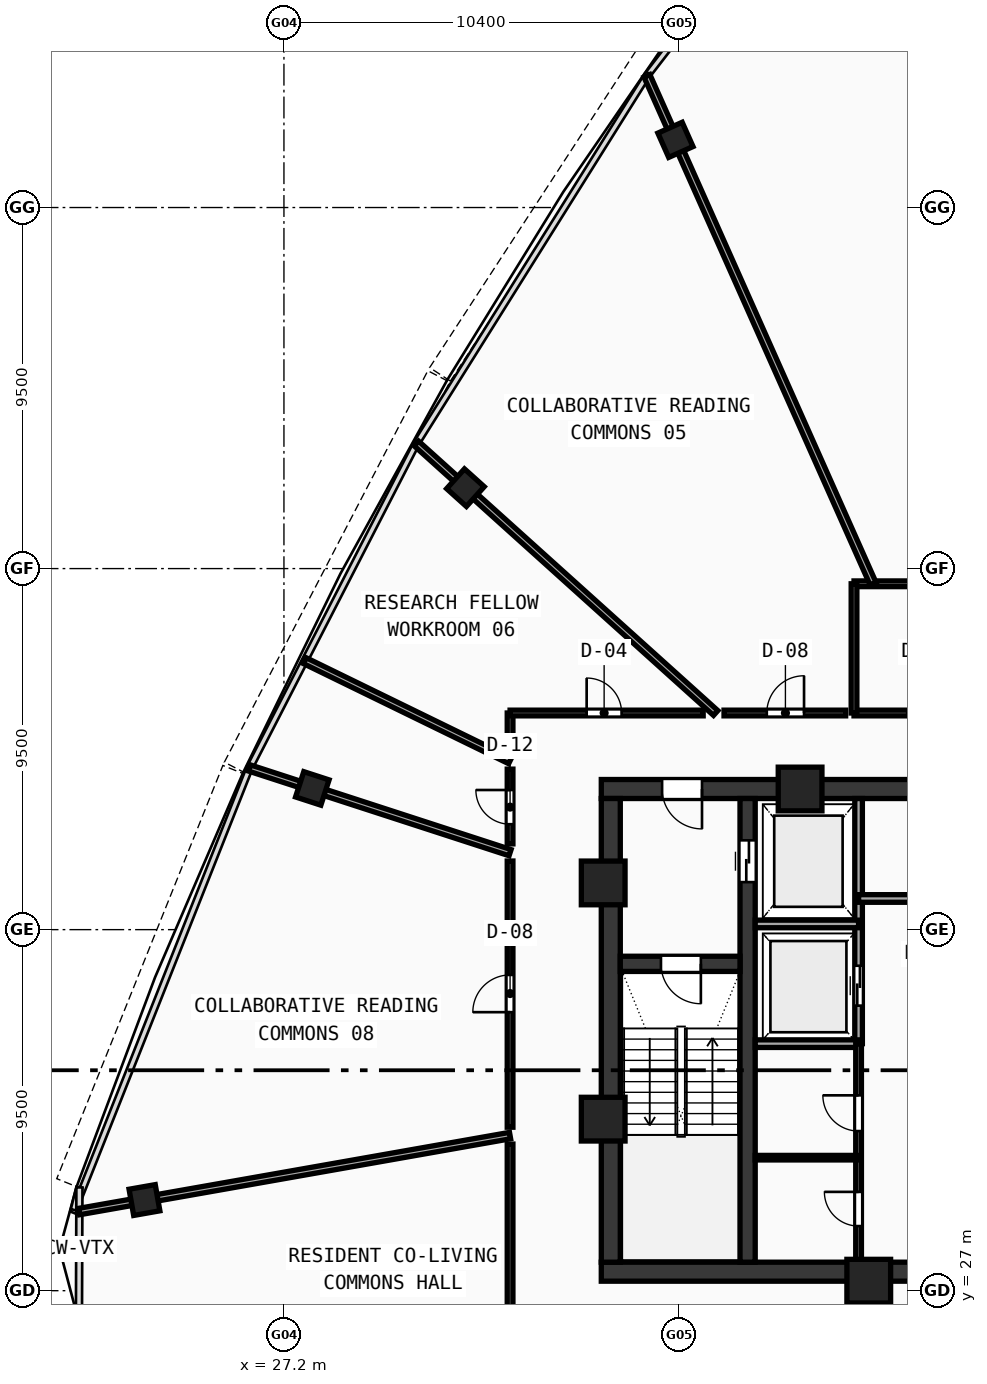
"""IFC4 building model, lengths in metres.
Left out: names, types, materials, properties, quantities, classifications, styles, units other than length and angle.
Written with IfcOpenShell. Run it as: python <this file> out.ifc"""

import sys

from ifc_helpers import new_model, si_unit, direction, frame, frame_2d, origin, origin_with_axes, origin_2d, place, context, subcontext, project, spatial, rectangle, hollow_rectangle, extrude, source, transform, mapped, element, fill, save


model = new_model("IFC4")
c1 = context("Model", 3, precision=1e-05, world=origin(), true_north=direction((0.0, 1.0)))
c2 = subcontext(c1, "Body", "Model", "MODEL_VIEW")
j1 = project(units=[si_unit("LENGTHUNIT", "METRE"), si_unit("PLANEANGLEUNIT", "RADIAN")], contexts=[c1])
p1 = place(None, origin())
s1 = spatial("IfcSite", under=j1, at=p1, CompositionType="ELEMENT")
p2 = place(p1, origin())
s2 = spatial("IfcBuilding", under=s1, at=p2, CompositionType="ELEMENT")
p3 = place(p2, frame((0.0, 0.0, 359.26)))
s3 = spatial("IfcBuildingStorey", under=s2, at=p3, CompositionType="ELEMENT", Elevation=359.26)
p4 = place(p3, frame((35.55, 27.5, 0.0), z_axis=(0.0, 0.0, 1.0), x_axis=(1.0, 0.0, 0.0)))
e1 = element("IfcWall", 1, at=p4, inside=s3, PredefinedType="SHEAR", context=c2, shape_type="SweptSolid", body=[
    extrude(rectangle(XDim=24.9, YDim=0.5, at=frame_2d((12.45, 0.0))), origin(), (0.0, 0.0, 1.0), 3.49),
])
p5 = place(p3, frame((35.55, 40.2, 0.0), z_axis=(0.0, 0.0, 1.0), x_axis=(1.0, 0.0, 0.0)))
e2 = element("IfcWall", 2, at=p5, inside=s3, PredefinedType="SHEAR", context=c2, shape_type="SweptSolid", body=[
    extrude(rectangle(XDim=11.25, YDim=0.5, at=frame_2d((5.625, 0.0))), origin(), (0.0, 0.0, 1.0), 3.49),
])
p6 = place(p5, frame((1.6, 0.0, 0.0)))
e3 = element("IfcOpeningElement", 3, at=p6, cuts=e2, PredefinedType="OPENING", context=c2, shape_type="SweptSolid", body=[
    extrude(rectangle(XDim=1.05, YDim=2.1, at=frame_2d((0.525, 1.05))), frame((0.0, 0.26, 0.0), z_axis=(0.0, -1.0, 0.0), x_axis=(1.0, 0.0, 0.0)), (0.0, 0.0, 1.0), 0.52),
])
p7 = place(p3, frame((35.8, 27.75, 0.0), z_axis=(0.0, 0.0, 1.0), x_axis=(0.0, 1.0, 0.0)))
e4 = element("IfcWall", 4, at=p7, inside=s3, PredefinedType="SHEAR", context=c2, shape_type="SweptSolid", body=[
    extrude(rectangle(XDim=12.2, YDim=0.5, at=frame_2d((6.1, 0.0))), origin(), (0.0, 0.0, 1.0), 3.49),
])
p8 = place(p3, frame((39.4, 27.75, 0.0), z_axis=(0.0, 0.0, 1.0), x_axis=(0.0, 1.0, 0.0)))
e5 = element("IfcWall", 5, at=p8, inside=s3, PredefinedType="SHEAR", context=c2, shape_type="SweptSolid", body=[
    extrude(rectangle(XDim=12.2, YDim=0.4, at=frame_2d((6.1, 0.0))), origin(), (0.0, 0.0, 1.0), 3.49),
])
p9 = place(p8, frame((10.0, 0.0, 0.0)))
e6 = element("IfcOpeningElement", 6, at=p9, cuts=e5, PredefinedType="OPENING", context=c2, shape_type="SweptSolid", body=[
    extrude(rectangle(XDim=1.1, YDim=2.1, at=frame_2d((0.55, 1.05))), frame((0.0, 0.21, 0.0), z_axis=(0.0, -1.0, 0.0), x_axis=(1.0, 0.0, 0.0)), (0.0, 0.0, 1.0), 0.42),
])
p10 = place(p3, frame((36.05, 35.6, 0.0), z_axis=(0.0, 0.0, 1.0), x_axis=(1.0, 0.0, 0.0)))
e7 = element("IfcWall", 7, at=p10, inside=s3, PredefinedType="SHEAR", context=c2, shape_type="SweptSolid", body=[
    extrude(rectangle(XDim=3.15, YDim=0.4, at=frame_2d((1.575, 0.0))), origin(), (0.0, 0.0, 1.0), 3.49),
])
p11 = place(p10, frame((1.07, 0.0, 0.0)))
e8 = element("IfcOpeningElement", 8, at=p11, cuts=e7, PredefinedType="OPENING", context=c2, shape_type="SweptSolid", body=[
    extrude(rectangle(XDim=1.05, YDim=2.1, at=frame_2d((0.525, 1.05))), frame((0.0, 0.21, 0.0), z_axis=(0.0, -1.0, 0.0), x_axis=(1.0, 0.0, 0.0)), (0.0, 0.0, 1.0), 0.42),
])
m1 = source(origin(), c2, "Body", "SweptSolid", [
    extrude(hollow_rectangle(XDim=1.15, YDim=1.15, WallThickness=0.048, at=origin_2d()), origin(), (0.0, 0.0, 1.0), 3.75),
])
for number, where, z_axis, x_axis in (
    (9, (42.588, 27.25, -0.26), (0.0, 0.0, 1.0), (1.0, 0.0, 0.0)),
    (10, (40.781, 40.2, -0.26), (0.0, 0.0, 1.0), (1.0, 0.0, 0.0)),
    (11, (35.6, 37.729, -0.26), (0.0, 0.0, 1.0), (1.0, 0.0, 0.0)),
    (12, (35.6, 31.513, -0.26), (0.0, 0.0, 1.0), (1.0, 0.0, 0.0)),
):
    element("IfcColumn", number, at=place(p3, frame(where, z_axis=z_axis, x_axis=x_axis)), inside=s3, PredefinedType="COLUMN", context=c2, shape_type="MappedRepresentation", body=[
        mapped(m1, transform((0.0, 0.0, 0.0), scale=1.0)),
    ])
m2 = source(origin(), c2, "Body", "SweptSolid", [
    extrude(hollow_rectangle(XDim=0.7, YDim=0.7, WallThickness=0.026, at=origin_2d()), origin(), (0.0, 0.0, 1.0), 3.75),
])
for number, where, z_axis, x_axis in (
    (13, (37.501, 57.281, -0.26), (0.0, 0.0, 1.0), (-0.914, -0.407, 0.0)),
    (14, (31.975, 48.129, -0.26), (0.0, 0.0, 1.0), (-0.669, -0.743, 0.0)),
    (15, (27.947, 40.216, -0.26), (0.0, 0.0, 1.0), (-0.309, -0.951, 0.0)),
    (16, (23.53, 29.385, -0.26), (0.0, 0.0, 1.0), (0.174, -0.985, 0.0)),
):
    element("IfcColumn", number, at=place(p3, frame(where, z_axis=z_axis, x_axis=x_axis)), inside=s3, PredefinedType="COLUMN", context=c2, shape_type="MappedRepresentation", body=[
        mapped(m2, transform((0.0, 0.0, 0.0), scale=1.0)),
    ])
p12 = place(p3, frame((42.32, 33.5, 0.0), z_axis=(0.0, 0.0, 1.0), x_axis=(0.0, 1.0, 0.0)))
e17 = element("IfcWall", 17, at=p12, inside=s3, PredefinedType="SOLIDWALL", context=c2, shape_type="SweptSolid", body=[
    extrude(rectangle(XDim=6.45, YDim=0.2, at=frame_2d((3.225, 0.0))), origin(), (0.0, 0.0, 1.0), 3.49),
])
p13 = place(p12, frame((1.0, 0.0, 0.0)))
e18 = element("IfcOpeningElement", 18, at=p13, cuts=e17, PredefinedType="OPENING", context=c2, shape_type="SweptSolid", body=[
    extrude(rectangle(XDim=1.05, YDim=2.1, at=frame_2d((0.525, 1.05))), frame((0.0, 0.11, 0.0), z_axis=(0.0, -1.0, 0.0), x_axis=(1.0, 0.0, 0.0)), (0.0, 0.0, 1.0), 0.22),
])
for number, where, z_axis, x_axis in (
    (19, (39.6, 36.65, 0.0), (0.0, 0.0, 1.0), (1.0, 0.0, 0.0)),
    (20, (39.6, 33.5, 0.0), (0.0, 0.0, 1.0), (1.0, 0.0, 0.0)),
):
    element("IfcWall", number, at=place(p3, frame(where, z_axis=z_axis, x_axis=x_axis)), inside=s3, PredefinedType="SOLIDWALL", context=c2, shape_type="SweptSolid", body=[
        extrude(rectangle(XDim=2.72, YDim=0.2, at=frame_2d((1.36, 0.0))), origin(), (0.0, 0.0, 1.0), 3.49),
    ])
p14 = place(p3, frame((42.32, 37.32, 0.0), z_axis=(0.0, 0.0, 1.0), x_axis=(1.0, 0.0, 0.0)))
e21 = element("IfcWall", 21, at=p14, inside=s3, PredefinedType="SOLIDWALL", context=c2, shape_type="SweptSolid", body=[
    extrude(rectangle(XDim=4.73, YDim=0.2, at=frame_2d((2.365, 0.0))), origin(), (0.0, 0.0, 1.0), 3.49),
])
p15 = place(p14, frame((1.8, 0.0, 0.0)))
e22 = element("IfcOpeningElement", 22, at=p15, cuts=e21, PredefinedType="OPENING", context=c2, shape_type="SweptSolid", body=[
    extrude(rectangle(XDim=0.9, YDim=2.1, at=frame_2d((0.45, 1.05))), frame((0.0, 0.11, 0.0), z_axis=(0.0, -1.0, 0.0), x_axis=(1.0, 0.0, 0.0)), (0.0, 0.0, 1.0), 0.22),
])
p16 = place(p3, frame((42.32, 27.6, 0.0), z_axis=(0.0, 0.0, 1.0), x_axis=(0.0, 1.0, 0.0)))
e23 = element("IfcWall", 23, at=p16, inside=s3, PredefinedType="PARTITIONING", context=c2, shape_type="SweptSolid", body=[
    extrude(rectangle(XDim=5.9, YDim=0.15, at=frame_2d((2.95, 0.0))), origin(), (0.0, 0.0, 1.0), 3.49),
])
p17 = place(p16, frame((1.1, 0.0, 0.0)))
e24 = element("IfcOpeningElement", 24, at=p17, cuts=e23, PredefinedType="OPENING", context=c2, shape_type="SweptSolid", body=[
    extrude(rectangle(XDim=0.9, YDim=2.1, at=frame_2d((0.45, 1.05))), frame((0.0, 0.085, 0.0), z_axis=(0.0, -1.0, 0.0), x_axis=(1.0, 0.0, 0.0)), (0.0, 0.0, 1.0), 0.17),
])
p18 = place(p16, frame((3.6, 0.0, 0.0)))
e25 = element("IfcOpeningElement", 25, at=p18, cuts=e23, PredefinedType="OPENING", context=c2, shape_type="SweptSolid", body=[
    extrude(rectangle(XDim=0.94, YDim=2.1, at=frame_2d((0.47, 1.05))), frame((0.0, 0.085, 0.0), z_axis=(0.0, -1.0, 0.0), x_axis=(1.0, 0.0, 0.0)), (0.0, 0.0, 1.0), 0.17),
])
p19 = place(p3, frame((39.6, 30.5, 0.0), z_axis=(0.0, 0.0, 1.0), x_axis=(1.0, 0.0, 0.0)))
e26 = element("IfcWall", 26, at=p19, inside=s3, PredefinedType="PARTITIONING", context=c2, shape_type="SweptSolid", body=[
    extrude(rectangle(XDim=2.72, YDim=0.12, at=frame_2d((1.36, 0.0))), origin(), (0.0, 0.0, 1.0), 3.49),
])
p20 = place(p3, frame((42.2, 42.2, 0.0), z_axis=(0.0, 0.0, 1.0), x_axis=(1.0, 0.0, 0.0)))
e27 = element("IfcWall", 27, at=p20, inside=s3, PredefinedType="PARTITIONING", context=c2, shape_type="SweptSolid", body=[
    extrude(rectangle(XDim=4.9, YDim=0.15, at=frame_2d((2.45, 0.0))), origin(), (0.0, 0.0, 1.0), 2.89),
])
p21 = place(p20, frame((1.4, 0.0, 0.0)))
e28 = element("IfcOpeningElement", 28, at=p21, cuts=e27, PredefinedType="OPENING", context=c2, shape_type="SweptSolid", body=[
    extrude(rectangle(XDim=0.92, YDim=2.1, at=frame_2d((0.46, 1.05))), frame((0.0, 0.085, 0.0), z_axis=(0.0, -1.0, 0.0), x_axis=(1.0, 0.0, 0.0)), (0.0, 0.0, 1.0), 0.17),
])
p22 = place(p3, frame((42.2, 45.6, 0.0), z_axis=(0.0, 0.0, 1.0), x_axis=(1.0, 0.0, 0.0)))
e29 = element("IfcWall", 29, at=p22, inside=s3, PredefinedType="PARTITIONING", context=c2, shape_type="SweptSolid", body=[
    extrude(rectangle(XDim=4.9, YDim=0.15, at=frame_2d((2.45, 0.0))), origin(), (0.0, 0.0, 1.0), 2.89),
])
p23 = place(p3, frame((42.2, 42.2, 0.0), z_axis=(0.0, 0.0, 1.0), x_axis=(0.0, 1.0, 0.0)))
e30 = element("IfcWall", 30, at=p23, inside=s3, PredefinedType="PARTITIONING", context=c2, shape_type="SweptSolid", body=[
    extrude(rectangle(XDim=3.4, YDim=0.15, at=frame_2d((1.7, 0.0))), origin(), (0.0, 0.0, 1.0), 3.49),
])
p24 = place(p3, frame((42.702, 45.6, 0.0), z_axis=(0.0, 0.0, 1.0), x_axis=(-0.406749951551, 0.913539532212, 0.0)))
e31 = element("IfcWall", 31, at=p24, inside=s3, PredefinedType="PARTITIONING", context=c2, shape_type="SweptSolid", body=[
    extrude(rectangle(XDim=14.63, YDim=0.17, at=frame_2d((7.315, 0.0))), origin(), (0.0, 0.0, 1.0), 2.89),
])
p25 = place(p3, frame((38.56, 42.2, 0.0), z_axis=(0.0, 0.0, 1.0), x_axis=(-0.743152066897, 0.66912256386, 0.0)))
e32 = element("IfcWall", 32, at=p25, inside=s3, PredefinedType="PARTITIONING", context=c2, shape_type="SweptSolid", body=[
    extrude(rectangle(XDim=10.596, YDim=0.17, at=frame_2d((5.298, 0.0))), origin(), (0.0, 0.0, 1.0), 2.89),
])
p26 = place(p3, frame((33.15, 40.943, 0.0), z_axis=(0.0, 0.0, 1.0), x_axis=(-0.898803189206, 0.438352400557, 0.0)))
e33 = element("IfcWall", 33, at=p26, inside=s3, PredefinedType="PARTITIONING", context=c2, shape_type="SweptSolid", body=[
    extrude(rectangle(XDim=6.01, YDim=0.17, at=frame_2d((3.005, 0.0))), origin(), (0.0, 0.0, 1.0), 2.89),
])
p27 = place(p3, frame((33.15, 38.525, 0.0), z_axis=(0.0, 0.0, 1.0), x_axis=(-0.951060950279, 0.309003347644, 0.0)))
e34 = element("IfcWall", 34, at=p27, inside=s3, PredefinedType="PARTITIONING", context=c2, shape_type="SweptSolid", body=[
    extrude(rectangle(XDim=7.207, YDim=0.17, at=frame_2d((3.604, 0.0))), origin(), (0.0, 0.0, 1.0), 2.89),
])
p28 = place(p3, frame((33.15, 31.082, 0.0), z_axis=(0.0, 0.0, 1.0), x_axis=(-0.984809370591, -0.17363900367, 0.0)))
e35 = element("IfcWall", 35, at=p28, inside=s3, PredefinedType="PARTITIONING", context=c2, shape_type="SweptSolid", body=[
    extrude(rectangle(XDim=11.517, YDim=0.17, at=frame_2d((5.758, 0.0))), origin(), (0.0, 0.0, 1.0), 2.89),
])
p29 = place(p3, frame((33.15, 24.9, 0.0), z_axis=(0.0, 0.0, 1.0), x_axis=(0.0, 1.0, 0.0)))
e36 = element("IfcWall", 36, at=p29, inside=s3, PredefinedType="PARTITIONING", context=c2, shape_type="SweptSolid", body=[
    extrude(rectangle(XDim=5.958, YDim=0.15, at=frame_2d((2.979, 0.0))), origin(), (0.0, 0.0, 1.0), 2.89),
])
p30 = place(p3, frame((33.15, 31.301, 0.0), z_axis=(0.0, 0.0, 1.0), x_axis=(0.0, 1.0, 0.0)))
e37 = element("IfcWall", 37, at=p30, inside=s3, PredefinedType="PARTITIONING", context=c2, shape_type="SweptSolid", body=[
    extrude(rectangle(XDim=7.004, YDim=0.15, at=frame_2d((3.502, 0.0))), origin(), (0.0, 0.0, 1.0), 3.49),
])
p31 = place(p30, frame((3.027, 0.0, 0.0)))
e38 = element("IfcOpeningElement", 38, at=p31, cuts=e37, PredefinedType="OPENING", context=c2, shape_type="SweptSolid", body=[
    extrude(rectangle(XDim=0.98, YDim=2.12, at=frame_2d((0.49, 1.06))), frame((0.0, 0.085, 0.0), z_axis=(0.0, -1.0, 0.0), x_axis=(1.0, 0.0, 0.0)), (0.0, 0.0, 1.0), 0.17),
])
p32 = place(p3, frame((33.15, 38.756, 0.0), z_axis=(0.0, 0.0, 1.0), x_axis=(0.0, 1.0, 0.0)))
e39 = element("IfcWall", 39, at=p32, inside=s3, PredefinedType="PARTITIONING", context=c2, shape_type="SweptSolid", body=[
    extrude(rectangle(XDim=1.967, YDim=0.15, at=frame_2d((0.983, 0.0))), origin(), (0.0, 0.0, 1.0), 3.14),
])
p33 = place(p32, frame((0.518, 0.0, 0.0)))
e40 = element("IfcOpeningElement", 40, at=p33, cuts=e39, PredefinedType="OPENING", context=c2, shape_type="SweptSolid", body=[
    extrude(rectangle(XDim=0.9, YDim=2.08, at=frame_2d((0.45, 1.04))), frame((0.0, 0.085, 0.0), z_axis=(0.0, -1.0, 0.0), x_axis=(1.0, 0.0, 0.0)), (0.0, 0.0, 1.0), 0.17),
])
p34 = place(p3, frame((33.15, 41.188, 0.0), z_axis=(0.0, 0.0, 1.0), x_axis=(0.0, 1.0, 0.0)))
e41 = element("IfcWall", 41, at=p34, inside=s3, PredefinedType="PARTITIONING", context=c2, shape_type="SweptSolid", body=[
    extrude(rectangle(XDim=1.012, YDim=0.15, at=frame_2d((0.506, 0.0))), origin(), (0.0, 0.0, 1.0), 3.49),
])
p35 = place(p3, frame((33.15, 42.2, 0.0), z_axis=(0.0, 0.0, 1.0), x_axis=(1.0, 0.0, 0.0)))
e42 = element("IfcWall", 42, at=p35, inside=s3, PredefinedType="PARTITIONING", context=c2, shape_type="SweptSolid", body=[
    extrude(rectangle(XDim=5.081, YDim=0.15, at=frame_2d((2.541, 0.0))), origin(), (0.0, 0.0, 1.0), 3.14),
])
p36 = place(p35, frame((2.015, 0.0, 0.0)))
e43 = element("IfcOpeningElement", 43, at=p36, cuts=e42, PredefinedType="OPENING", context=c2, shape_type="SweptSolid", body=[
    extrude(rectangle(XDim=0.92, YDim=2.1, at=frame_2d((0.46, 1.05))), frame((0.0, 0.085, 0.0), z_axis=(0.0, -1.0, 0.0), x_axis=(1.0, 0.0, 0.0)), (0.0, 0.0, 1.0), 0.17),
])
p37 = place(p3, frame((38.78, 42.2, 0.0), z_axis=(0.0, 0.0, 1.0), x_axis=(1.0, 0.0, 0.0)))
e44 = element("IfcWall", 44, at=p37, inside=s3, PredefinedType="PARTITIONING", context=c2, shape_type="SweptSolid", body=[
    extrude(rectangle(XDim=3.2, YDim=0.15, at=frame_2d((1.6, 0.0))), origin(), (0.0, 0.0, 1.0), 2.89),
])
p38 = place(p37, frame((1.125, 0.0, 0.0)))
e45 = element("IfcOpeningElement", 45, at=p38, cuts=e44, PredefinedType="OPENING", context=c2, shape_type="SweptSolid", body=[
    extrude(rectangle(XDim=0.98, YDim=2.12, at=frame_2d((0.49, 1.06))), frame((0.0, 0.085, 0.0), z_axis=(0.0, -1.0, 0.0), x_axis=(1.0, 0.0, 0.0)), (0.0, 0.0, 1.0), 0.17),
])
m3 = source(origin(), c2, "Body", "SweptSolid", [
    extrude(rectangle(XDim=1.05, YDim=2.1, at=frame_2d((0.525, 1.05))), frame((0.0, 0.025, 0.0), z_axis=(0.0, -1.0, 0.0), x_axis=(1.0, 0.0, 0.0)), (0.0, 0.0, 1.0), 0.05),
])
p39 = place(p11, frame((1.05, 0.0, 0.0), z_axis=(0.0, 0.0, 1.0), x_axis=(-1.0, 0.0, 0.0)))
e46 = element("IfcDoor", 46, at=p39, inside=s3, OperationType="SINGLE_SWING_LEFT", PredefinedType="DOOR", context=c2, shape_type="MappedRepresentation", body=[
    mapped(m3, transform((0.0, 0.0, 0.0), scale=1.0)),
])
fill(e8, e46)
p40 = place(p6, frame((1.05, 0.0, 0.0), z_axis=(0.0, 0.0, 1.0), x_axis=(-1.0, 0.0, 0.0)))
e47 = element("IfcDoor", 47, at=p40, inside=s3, OperationType="SINGLE_SWING_LEFT", PredefinedType="DOOR", context=c2, shape_type="MappedRepresentation", body=[
    mapped(m3, transform((0.0, 0.0, 0.0), scale=1.0)),
])
fill(e3, e47)
m4 = source(origin(), c2, "Body", "SweptSolid", [
    extrude(rectangle(XDim=1.1, YDim=2.1, at=frame_2d((0.55, 1.05))), frame((0.0, 0.025, 0.0), z_axis=(0.0, -1.0, 0.0), x_axis=(1.0, 0.0, 0.0)), (0.0, 0.0, 1.0), 0.05),
])
p41 = place(p9, frame((1.1, 0.0, 0.0), z_axis=(0.0, 0.0, 1.0), x_axis=(-1.0, 0.0, 0.0)))
e48 = element("IfcDoor", 48, at=p41, inside=s3, OperationType="DOUBLE_DOOR_SLIDING", PredefinedType="DOOR", context=c2, shape_type="MappedRepresentation", body=[
    mapped(m4, transform((0.0, 0.0, 0.0), scale=1.0)),
])
fill(e6, e48)
p42 = place(p13, origin_with_axes())
e49 = element("IfcDoor", 49, at=p42, inside=s3, OperationType="DOUBLE_DOOR_SLIDING", PredefinedType="DOOR", context=c2, shape_type="MappedRepresentation", body=[
    mapped(m3, transform((0.0, 0.0, 0.0), scale=1.0)),
])
fill(e18, e49)
m5 = source(origin(), c2, "Body", "SweptSolid", [
    extrude(rectangle(XDim=0.9, YDim=2.1, at=frame_2d((0.45, 1.05))), frame((0.0, 0.025, 0.0), z_axis=(0.0, -1.0, 0.0), x_axis=(1.0, 0.0, 0.0)), (0.0, 0.0, 1.0), 0.05),
])
p43 = place(p17, origin_with_axes())
e50 = element("IfcDoor", 50, at=p43, inside=s3, OperationType="SINGLE_SWING_RIGHT", PredefinedType="DOOR", context=c2, shape_type="MappedRepresentation", body=[
    mapped(m5, transform((0.0, 0.0, 0.0), scale=1.0)),
])
fill(e24, e50)
m6 = source(origin(), c2, "Body", "SweptSolid", [
    extrude(rectangle(XDim=0.94, YDim=2.1, at=frame_2d((0.47, 1.05))), frame((0.0, 0.025, 0.0), z_axis=(0.0, -1.0, 0.0), x_axis=(1.0, 0.0, 0.0)), (0.0, 0.0, 1.0), 0.05),
])
p44 = place(p18, origin_with_axes())
e51 = element("IfcDoor", 51, at=p44, inside=s3, OperationType="SINGLE_SWING_RIGHT", PredefinedType="DOOR", context=c2, shape_type="MappedRepresentation", body=[
    mapped(m6, transform((0.0, 0.0, 0.0), scale=1.0)),
])
fill(e25, e51)
m7 = source(origin(), c2, "Body", "SweptSolid", [
    extrude(rectangle(XDim=0.92, YDim=2.1, at=frame_2d((0.46, 1.05))), frame((0.0, 0.025, 0.0), z_axis=(0.0, -1.0, 0.0), x_axis=(1.0, 0.0, 0.0)), (0.0, 0.0, 1.0), 0.05),
])
p45 = place(p21, frame((0.92, 0.0, 0.0), z_axis=(0.0, 0.0, 1.0), x_axis=(-1.0, 0.0, 0.0)))
e52 = element("IfcDoor", 52, at=p45, inside=s3, OperationType="SINGLE_SWING_LEFT", PredefinedType="DOOR", context=c2, shape_type="MappedRepresentation", body=[
    mapped(m7, transform((0.0, 0.0, 0.0), scale=1.0)),
])
fill(e28, e52)
m8 = source(origin(), c2, "Body", "SweptSolid", [
    extrude(rectangle(XDim=0.98, YDim=2.12, at=frame_2d((0.49, 1.06))), frame((0.0, 0.025, 0.0), z_axis=(0.0, -1.0, 0.0), x_axis=(1.0, 0.0, 0.0)), (0.0, 0.0, 1.0), 0.05),
])
p46 = place(p38, origin_with_axes())
e53 = element("IfcDoor", 53, at=p46, inside=s3, OperationType="SINGLE_SWING_RIGHT", PredefinedType="DOOR", context=c2, shape_type="MappedRepresentation", body=[
    mapped(m8, transform((0.0, 0.0, 0.0), scale=1.0)),
])
fill(e45, e53)
p47 = place(p36, origin_with_axes())
e54 = element("IfcDoor", 54, at=p47, inside=s3, OperationType="SINGLE_SWING_LEFT", PredefinedType="DOOR", context=c2, shape_type="MappedRepresentation", body=[
    mapped(m7, transform((0.0, 0.0, 0.0), scale=1.0)),
])
fill(e43, e54)
m9 = source(origin(), c2, "Body", "SweptSolid", [
    extrude(rectangle(XDim=0.9, YDim=2.08, at=frame_2d((0.45, 1.04))), frame((0.0, 0.025, 0.0), z_axis=(0.0, -1.0, 0.0), x_axis=(1.0, 0.0, 0.0)), (0.0, 0.0, 1.0), 0.05),
])
p48 = place(p33, origin_with_axes())
e55 = element("IfcDoor", 55, at=p48, inside=s3, OperationType="SINGLE_SWING_RIGHT", PredefinedType="DOOR", context=c2, shape_type="MappedRepresentation", body=[
    mapped(m9, transform((0.0, 0.0, 0.0), scale=1.0)),
])
fill(e40, e55)
p49 = place(p31, origin_with_axes())
e56 = element("IfcDoor", 56, at=p49, inside=s3, OperationType="SINGLE_SWING_LEFT", PredefinedType="DOOR", context=c2, shape_type="MappedRepresentation", body=[
    mapped(m8, transform((0.0, 0.0, 0.0), scale=1.0)),
])
fill(e38, e56)
save(model, sys.argv[1])
